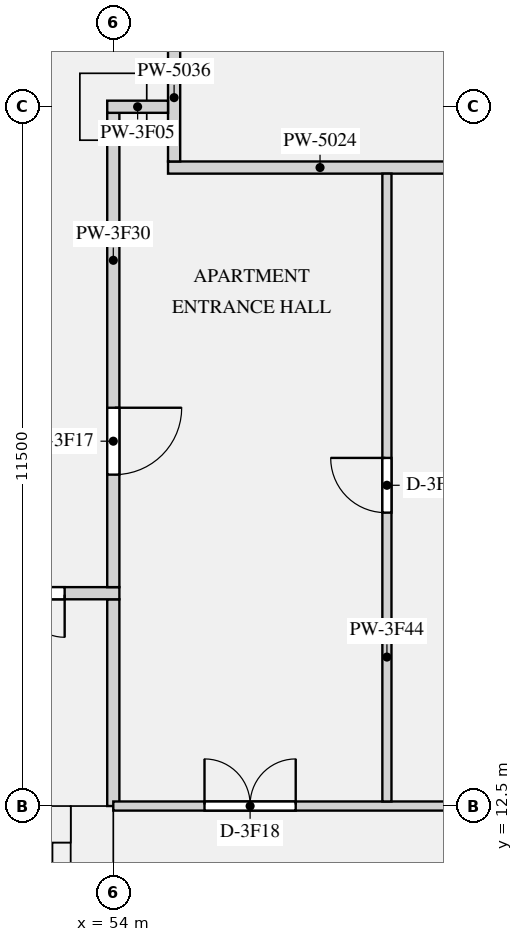
"""IFC4 building model, lengths in metres.
Left out: names, types, materials, properties, quantities, classifications, styles, units other than length and angle.
Written with IfcOpenShell. Run it as: python <this file> out.ifc"""

import sys

from ifc_helpers import new_model, si_unit, direction, frame, frame_2d, origin, origin_2d, place, context, subcontext, project, spatial, rectangle, extrude, element, fill, save


model = new_model("IFC4")
c1 = context("Model", 3, precision=1e-05, world=origin(), true_north=direction((0.0, 1.0)))
c2 = subcontext(c1, "Body", "Model", "MODEL_VIEW")
j1 = project(units=[si_unit("LENGTHUNIT", "METRE"), si_unit("PLANEANGLEUNIT", "RADIAN")], contexts=[c1])
p1 = place(None, origin())
s1 = spatial("IfcSite", under=j1, at=p1, CompositionType="ELEMENT")
p2 = place(p1, origin())
s2 = spatial("IfcBuilding", under=s1, at=p2, CompositionType="ELEMENT")
p3 = place(p2, frame((0.0, 0.0, 182.25)))
s3 = spatial("IfcBuildingStorey", under=s2, at=p3, CompositionType="ELEMENT", Elevation=182.25)
p4 = place(p3, frame((54.0, 24.0, 0.0), z_axis=(0.0, 0.0, 1.0), x_axis=(1.0, 0.0, 0.0)))
e1 = element("IfcColumn", 1, at=p4, inside=s3, PredefinedType="COLUMN", context=c2, shape_type="SweptSolid", body=[
    extrude(rectangle(XDim=1.1, YDim=1.1, at=origin_2d()), origin(), (0.0, 0.0, 1.0), 3.15),
])
p5 = place(p3, frame((53.65, 0.0, 0.0), z_axis=(0.0, 0.0, 1.0), x_axis=(0.0, 1.0, 0.0)))
e2 = element("IfcWall", 2, at=p5, inside=s3, PredefinedType="SHEAR", context=c2, shape_type="SweptSolid", body=[
    extrude(rectangle(XDim=12.5, YDim=0.7, at=frame_2d((6.25, 0.0))), origin(), (0.0, 0.0, 1.0), 3.15),
])
p6 = place(p3, frame((18.7, 12.2, 0.0), z_axis=(0.0, 0.0, 1.0), x_axis=(1.0, 0.0, 0.0)))
e3 = element("IfcWall", 3, at=p6, inside=s3, PredefinedType="SHEAR", context=c2, shape_type="SweptSolid", body=[
    extrude(rectangle(XDim=34.6, YDim=0.6, at=frame_2d((17.3, 0.0))), origin(), (0.0, 0.0, 1.0), 3.15),
])
p7 = place(p6, frame((24.475, 0.0, 0.0)))
e4 = element("IfcOpeningElement", 4, at=p7, cuts=e3, PredefinedType="OPENING", context=c2, shape_type="SweptSolid", body=[
    extrude(rectangle(XDim=1.1, YDim=2.1, at=frame_2d((0.55, 1.05))), frame((0.0, 0.31, 0.0), z_axis=(0.0, -1.0, 0.0), x_axis=(1.0, 0.0, 0.0)), (0.0, 0.0, 1.0), 0.62),
])
p8 = place(p6, frame((26.725, 0.0, 0.0)))
e5 = element("IfcOpeningElement", 5, at=p8, cuts=e3, PredefinedType="OPENING", context=c2, shape_type="SweptSolid", body=[
    extrude(rectangle(XDim=1.1, YDim=2.1, at=frame_2d((0.55, 1.05))), frame((0.0, 0.31, 0.0), z_axis=(0.0, -1.0, 0.0), x_axis=(1.0, 0.0, 0.0)), (0.0, 0.0, 1.0), 0.62),
])
p9 = place(p6, frame((28.975, 0.0, 0.0)))
e6 = element("IfcOpeningElement", 6, at=p9, cuts=e3, PredefinedType="OPENING", context=c2, shape_type="SweptSolid", body=[
    extrude(rectangle(XDim=1.1, YDim=2.1, at=frame_2d((0.55, 1.05))), frame((0.0, 0.31, 0.0), z_axis=(0.0, -1.0, 0.0), x_axis=(1.0, 0.0, 0.0)), (0.0, 0.0, 1.0), 0.62),
])
p10 = place(p6, frame((4.85, 0.0, 0.0)))
e7 = element("IfcOpeningElement", 7, at=p10, cuts=e3, PredefinedType="OPENING", context=c2, shape_type="SweptSolid", body=[
    extrude(rectangle(XDim=0.9, YDim=2.1, at=frame_2d((0.45, 1.05))), frame((0.0, 0.31, 0.0), z_axis=(0.0, -1.0, 0.0), x_axis=(1.0, 0.0, 0.0)), (0.0, 0.0, 1.0), 0.62),
])
p11 = place(p6, frame((11.85, 0.0, 0.0)))
e8 = element("IfcOpeningElement", 8, at=p11, cuts=e3, PredefinedType="OPENING", context=c2, shape_type="SweptSolid", body=[
    extrude(rectangle(XDim=0.9, YDim=2.1, at=frame_2d((0.45, 1.05))), frame((0.0, 0.31, 0.0), z_axis=(0.0, -1.0, 0.0), x_axis=(1.0, 0.0, 0.0)), (0.0, 0.0, 1.0), 0.62),
])
p12 = place(p6, frame((18.35, 0.0, 0.0)))
e9 = element("IfcOpeningElement", 9, at=p12, cuts=e3, PredefinedType="OPENING", context=c2, shape_type="SweptSolid", body=[
    extrude(rectangle(XDim=0.9, YDim=2.1, at=frame_2d((0.45, 1.05))), frame((0.0, 0.31, 0.0), z_axis=(0.0, -1.0, 0.0), x_axis=(1.0, 0.0, 0.0)), (0.0, 0.0, 1.0), 0.62),
])
p13 = place(p6, frame((1.45, 0.0, 0.0)))
e10 = element("IfcOpeningElement", 10, at=p13, cuts=e3, PredefinedType="OPENING", context=c2, shape_type="SweptSolid", body=[
    extrude(rectangle(XDim=1.2, YDim=2.1, at=frame_2d((0.6, 1.05))), frame((0.0, 0.31, 0.0), z_axis=(0.0, -1.0, 0.0), x_axis=(1.0, 0.0, 0.0)), (0.0, 0.0, 1.0), 0.62),
])
p14 = place(p6, frame((31.95, 0.0, 0.0)))
e11 = element("IfcOpeningElement", 11, at=p14, cuts=e3, PredefinedType="OPENING", context=c2, shape_type="SweptSolid", body=[
    extrude(rectangle(XDim=1.2, YDim=2.1, at=frame_2d((0.6, 1.05))), frame((0.0, 0.31, 0.0), z_axis=(0.0, -1.0, 0.0), x_axis=(1.0, 0.0, 0.0)), (0.0, 0.0, 1.0), 0.62),
])
p15 = place(p3, frame((53.15, 1.0, 0.0), z_axis=(0.0, 0.0, 1.0), x_axis=(0.0, 1.0, 0.0)))
e12 = element("IfcWall", 12, at=p15, inside=s3, PredefinedType="SHEAR", context=c2, shape_type="SweptSolid", body=[
    extrude(rectangle(XDim=10.9, YDim=0.3, at=frame_2d((5.45, 0.0))), origin(), (0.0, 0.0, 1.0), 3.15),
])
p16 = place(p3, frame((54.9, 23.0, 0.0), z_axis=(0.0, 0.0, 1.0), x_axis=(1.0, 0.0, 0.0)))
e13 = element("IfcWall", 13, at=p16, inside=s3, PredefinedType="PARTITIONING", context=c2, shape_type="SweptSolid", body=[
    extrude(rectangle(XDim=5.0, YDim=0.2, at=frame_2d((2.5, 0.0))), origin(), (0.0, 0.0, 1.0), 2.65),
])
p17 = place(p3, frame((54.0, 12.5, 0.0), z_axis=(0.0, 0.0, 1.0), x_axis=(0.0, 1.0, 0.0)))
e14 = element("IfcWall", 14, at=p17, inside=s3, PredefinedType="PARTITIONING", context=c2, shape_type="SweptSolid", body=[
    extrude(rectangle(XDim=3.4, YDim=0.2, at=frame_2d((1.7, 0.0))), origin(), (0.0, 0.0, 1.0), 2.65),
])
p18 = place(p3, frame((55.0, 23.1, 0.0), z_axis=(0.0, 0.0, 1.0), x_axis=(0.0, 1.0, 0.0)))
e15 = element("IfcWall", 15, at=p18, inside=s3, PredefinedType="PARTITIONING", context=c2, shape_type="SweptSolid", body=[
    extrude(rectangle(XDim=3.8, YDim=0.2, at=frame_2d((1.9, 0.0))), origin(), (0.0, 0.0, 1.0), 2.65),
])
p19 = place(p18, frame((2.1, 0.0, 0.0)))
e16 = element("IfcOpeningElement", 16, at=p19, cuts=e15, PredefinedType="OPENING", context=c2, shape_type="SweptSolid", body=[
    extrude(rectangle(XDim=1.2, YDim=2.1, at=frame_2d((0.6, 1.05))), frame((0.0, 0.11, 0.0), z_axis=(0.0, -1.0, 0.0), x_axis=(1.0, 0.0, 0.0)), (0.0, 0.0, 1.0), 0.22),
])
p20 = place(p3, frame((53.9, 24.0, 0.0), z_axis=(0.0, 0.0, 1.0), x_axis=(1.0, 0.0, 0.0)))
e17 = element("IfcWall", 17, at=p20, inside=s3, PredefinedType="PARTITIONING", context=c2, shape_type="SweptSolid", body=[
    extrude(rectangle(XDim=1.0, YDim=0.2, at=frame_2d((0.5, 0.0))), origin(), (0.0, 0.0, 1.0), 2.65),
])
p21 = place(p3, frame((54.0, 12.5, 0.0), z_axis=(0.0, 0.0, 1.0), x_axis=(1.0, 0.0, 0.0)))
e18 = element("IfcWall", 18, at=p21, inside=s3, PredefinedType="PARTITIONING", context=c2, shape_type="SweptSolid", body=[
    extrude(rectangle(XDim=17.3, YDim=0.15, at=frame_2d((8.65, 0.0))), origin(), (0.0, 0.0, 1.0), 2.65),
])
p22 = place(p21, frame((1.5, 0.0, 0.0)))
e19 = element("IfcOpeningElement", 19, at=p22, cuts=e18, PredefinedType="OPENING", context=c2, shape_type="SweptSolid", body=[
    extrude(rectangle(XDim=1.5, YDim=2.1, at=frame_2d((0.75, 1.05))), frame((0.0, 0.085, 0.0), z_axis=(0.0, -1.0, 0.0), x_axis=(1.0, 0.0, 0.0)), (0.0, 0.0, 1.0), 0.17),
])
p23 = place(p21, frame((12.75, 0.0, 0.0)))
e20 = element("IfcOpeningElement", 20, at=p23, cuts=e18, PredefinedType="OPENING", context=c2, shape_type="SweptSolid", body=[
    extrude(rectangle(XDim=1.5, YDim=2.1, at=frame_2d((0.75, 1.05))), frame((0.0, 0.085, 0.0), z_axis=(0.0, -1.0, 0.0), x_axis=(1.0, 0.0, 0.0)), (0.0, 0.0, 1.0), 0.17),
])
p24 = place(p3, frame((17.9, 16.0, 0.0), z_axis=(0.0, 0.0, 1.0), x_axis=(1.0, 0.0, 0.0)))
e21 = element("IfcWall", 21, at=p24, inside=s3, PredefinedType="PARTITIONING", context=c2, shape_type="SweptSolid", body=[
    extrude(rectangle(XDim=36.2, YDim=0.2, at=frame_2d((18.1, 0.0))), origin(), (0.0, 0.0, 1.0), 2.65),
])
p25 = place(p24, frame((0.9, 0.0, 0.0)))
e22 = element("IfcOpeningElement", 22, at=p25, cuts=e21, PredefinedType="OPENING", context=c2, shape_type="SweptSolid", body=[
    extrude(rectangle(XDim=1.4, YDim=2.1, at=frame_2d((0.7, 1.05))), frame((0.0, 0.11, 0.0), z_axis=(0.0, -1.0, 0.0), x_axis=(1.0, 0.0, 0.0)), (0.0, 0.0, 1.0), 0.22),
])
p26 = place(p24, frame((33.9, 0.0, 0.0)))
e23 = element("IfcOpeningElement", 23, at=p26, cuts=e21, PredefinedType="OPENING", context=c2, shape_type="SweptSolid", body=[
    extrude(rectangle(XDim=1.4, YDim=2.1, at=frame_2d((0.7, 1.05))), frame((0.0, 0.11, 0.0), z_axis=(0.0, -1.0, 0.0), x_axis=(1.0, 0.0, 0.0)), (0.0, 0.0, 1.0), 0.22),
])
p27 = place(p3, frame((54.0, 16.1, 0.0), z_axis=(0.0, 0.0, 1.0), x_axis=(0.0, 1.0, 0.0)))
e24 = element("IfcWall", 24, at=p27, inside=s3, PredefinedType="PARTITIONING", context=c2, shape_type="SweptSolid", body=[
    extrude(rectangle(XDim=7.8, YDim=0.2, at=frame_2d((3.9, 0.0))), origin(), (0.0, 0.0, 1.0), 2.65),
])
p28 = place(p27, frame((1.85, 0.0, 0.0)))
e25 = element("IfcOpeningElement", 25, at=p28, cuts=e24, PredefinedType="OPENING", context=c2, shape_type="SweptSolid", body=[
    extrude(rectangle(XDim=1.1, YDim=2.1, at=frame_2d((0.55, 1.05))), frame((0.0, 0.11, 0.0), z_axis=(0.0, -1.0, 0.0), x_axis=(1.0, 0.0, 0.0)), (0.0, 0.0, 1.0), 0.22),
])
p29 = place(p3, frame((58.5, 12.575, 0.0), z_axis=(0.0, 0.0, 1.0), x_axis=(0.0, 1.0, 0.0)))
e26 = element("IfcWall", 26, at=p29, inside=s3, PredefinedType="PARTITIONING", context=c2, shape_type="SweptSolid", body=[
    extrude(rectangle(XDim=10.325, YDim=0.15, at=frame_2d((5.163, 0.0))), origin(), (0.0, 0.0, 1.0), 2.65),
])
p30 = place(p29, frame((4.75, 0.0, 0.0)))
e27 = element("IfcOpeningElement", 27, at=p30, cuts=e26, PredefinedType="OPENING", context=c2, shape_type="SweptSolid", body=[
    extrude(rectangle(XDim=0.9, YDim=2.1, at=frame_2d((0.45, 1.05))), frame((0.0, 0.085, 0.0), z_axis=(0.0, -1.0, 0.0), x_axis=(1.0, 0.0, 0.0)), (0.0, 0.0, 1.0), 0.17),
])
p31 = place(p26, frame((1.4, 0.0, 0.0), z_axis=(0.0, 0.0, 1.0), x_axis=(-1.0, 0.0, 0.0)))
e28 = element("IfcDoor", 28, at=p31, inside=s3, OperationType="DOUBLE_DOOR_SINGLE_SWING", PredefinedType="DOOR", context=c2, shape_type="SweptSolid", body=[
    extrude(rectangle(XDim=1.4, YDim=2.1, at=frame_2d((0.7, 1.05))), frame((0.0, 0.025, 0.0), z_axis=(0.0, -1.0, 0.0), x_axis=(1.0, 0.0, 0.0)), (0.0, 0.0, 1.0), 0.05),
])
fill(e23, e28)
p32 = place(p28, frame((1.1, 0.0, 0.0), z_axis=(0.0, 0.0, 1.0), x_axis=(-1.0, 0.0, 0.0)))
e29 = element("IfcDoor", 29, at=p32, inside=s3, OperationType="SINGLE_SWING_LEFT", PredefinedType="DOOR", context=c2, shape_type="SweptSolid", body=[
    extrude(rectangle(XDim=1.1, YDim=2.1, at=frame_2d((0.55, 1.05))), frame((0.0, 0.025, 0.0), z_axis=(0.0, -1.0, 0.0), x_axis=(1.0, 0.0, 0.0)), (0.0, 0.0, 1.0), 0.05),
])
fill(e25, e29)
p33 = place(p22, origin())
e30 = element("IfcDoor", 30, at=p33, inside=s3, OperationType="DOUBLE_DOOR_SINGLE_SWING", PredefinedType="DOOR", context=c2, shape_type="SweptSolid", body=[
    extrude(rectangle(XDim=1.5, YDim=2.1, at=frame_2d((0.75, 1.05))), frame((0.0, 0.025, 0.0), z_axis=(0.0, -1.0, 0.0), x_axis=(1.0, 0.0, 0.0)), (0.0, 0.0, 1.0), 0.05),
])
fill(e19, e30)
p34 = place(p30, origin())
e31 = element("IfcDoor", 31, at=p34, inside=s3, OperationType="SINGLE_SWING_RIGHT", PredefinedType="DOOR", context=c2, shape_type="SweptSolid", body=[
    extrude(rectangle(XDim=0.9, YDim=2.1, at=frame_2d((0.45, 1.05))), frame((0.0, 0.025, 0.0), z_axis=(0.0, -1.0, 0.0), x_axis=(1.0, 0.0, 0.0)), (0.0, 0.0, 1.0), 0.05),
])
fill(e27, e31)
save(model, sys.argv[1])
